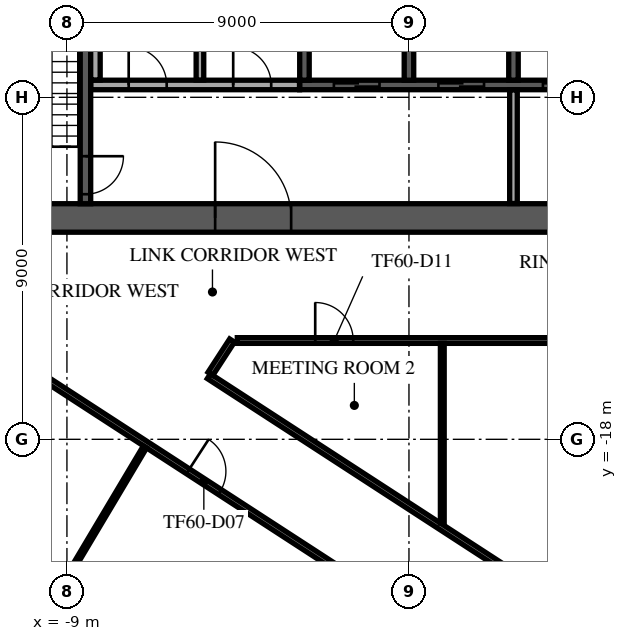
"""IFC4 building model, lengths in metres.
Left out: names, types, materials, properties, quantities, classifications, styles, units other than length and angle.
Written with IfcOpenShell. Run it as: python <this file> out.ifc"""

import sys

from ifc_helpers import new_model, si_unit, direction, frame, frame_2d, origin, place, context, subcontext, project, spatial, rectangle, extrude, element, fill, save


model = new_model("IFC4")
c1 = context("Model", 3, precision=1e-05, world=origin(), true_north=direction((0.0, 1.0)))
c2 = subcontext(c1, "Body", "Model", "MODEL_VIEW")
j1 = project(units=[si_unit("LENGTHUNIT", "METRE"), si_unit("PLANEANGLEUNIT", "RADIAN")], contexts=[c1])
p1 = place(None, origin())
s1 = spatial("IfcSite", under=j1, at=p1, CompositionType="ELEMENT")
p2 = place(p1, origin())
s2 = spatial("IfcBuilding", under=s1, at=p2, CompositionType="ELEMENT")
p3 = place(p2, frame((0.0, 0.0, 254.9)))
s3 = spatial("IfcBuildingStorey", under=s2, at=p3, CompositionType="ELEMENT", Elevation=254.9)
p4 = place(p3, frame((-12.55, -12.175, 0.0), z_axis=(0.0, 0.0, 1.0), x_axis=(1.0, 0.0, 0.0)))
e1 = element("IfcWall", 1, at=p4, inside=s3, PredefinedType="SHEAR", context=c2, shape_type="SweptSolid", body=[
    extrude(rectangle(XDim=25.1, YDim=0.75, at=frame_2d((12.55, 0.0))), origin(), (0.0, 0.0, 1.0), 3.64),
])
p5 = place(p4, frame((7.45, 0.0, 0.0)))
e2 = element("IfcOpeningElement", 2, at=p5, cuts=e1, PredefinedType="OPENING", context=c2, shape_type="SweptSolid", body=[
    extrude(rectangle(XDim=2.0, YDim=2.1, at=frame_2d((1.0, 1.05))), frame((0.0, 0.385, 0.0), z_axis=(0.0, -1.0, 0.0), x_axis=(1.0, 0.0, 0.0)), (0.0, 0.0, 1.0), 0.77),
])
p6 = place(p4, frame((17.575, 0.0, 0.0)))
e3 = element("IfcOpeningElement", 3, at=p6, cuts=e1, PredefinedType="OPENING", context=c2, shape_type="SweptSolid", body=[
    extrude(rectangle(XDim=1.2, YDim=2.1, at=frame_2d((0.6, 1.05))), frame((0.0, 0.385, 0.0), z_axis=(0.0, -1.0, 0.0), x_axis=(1.0, 0.0, 0.0)), (0.0, 0.0, 1.0), 0.77),
])
p7 = place(p4, frame((1.725, 0.0, 0.0)))
e4 = element("IfcOpeningElement", 4, at=p7, cuts=e1, PredefinedType="OPENING", context=c2, shape_type="SweptSolid", body=[
    extrude(rectangle(XDim=1.2, YDim=2.1, at=frame_2d((0.6, 1.05))), frame((0.0, 0.385, 0.0), z_axis=(0.0, -1.0, 0.0), x_axis=(1.0, 0.0, 0.0)), (0.0, 0.0, 1.0), 0.77),
])
p8 = place(p4, frame((22.175, 0.0, 0.0)))
e5 = element("IfcOpeningElement", 5, at=p8, cuts=e1, PredefinedType="OPENING", context=c2, shape_type="SweptSolid", body=[
    extrude(rectangle(XDim=1.2, YDim=2.1, at=frame_2d((0.6, 1.05))), frame((0.0, 0.385, 0.0), z_axis=(0.0, -1.0, 0.0), x_axis=(1.0, 0.0, 0.0)), (0.0, 0.0, 1.0), 0.77),
])
p9 = place(p3, frame((-2.875, -8.675, 0.0), z_axis=(0.0, 0.0, 1.0), x_axis=(1.0, 0.0, 0.0)))
e6 = element("IfcWall", 6, at=p9, inside=s3, PredefinedType="SOLIDWALL", context=c2, shape_type="SweptSolid", body=[
    extrude(rectangle(XDim=11.25, YDim=0.25, at=frame_2d((5.625, 0.0))), origin(), (0.0, 0.0, 1.0), 3.64),
])
p10 = place(p9, frame((0.9, 0.0, 0.0)))
e7 = element("IfcOpeningElement", 7, at=p10, cuts=e6, PredefinedType="OPENING", context=c2, shape_type="SweptSolid", body=[
    extrude(rectangle(XDim=1.2, YDim=2.1, at=frame_2d((0.6, 1.05))), frame((0.0, 0.135, 0.0), z_axis=(0.0, -1.0, 0.0), x_axis=(1.0, 0.0, 0.0)), (0.0, 0.0, 1.0), 0.27),
])
p11 = place(p9, frame((3.65, 0.0, 0.0)))
e8 = element("IfcOpeningElement", 8, at=p11, cuts=e6, PredefinedType="OPENING", context=c2, shape_type="SweptSolid", body=[
    extrude(rectangle(XDim=1.2, YDim=2.1, at=frame_2d((0.6, 1.05))), frame((0.0, 0.135, 0.0), z_axis=(0.0, -1.0, 0.0), x_axis=(1.0, 0.0, 0.0)), (0.0, 0.0, 1.0), 0.27),
])
p12 = place(p9, frame((6.4, 0.0, 0.0)))
e9 = element("IfcOpeningElement", 9, at=p12, cuts=e6, PredefinedType="OPENING", context=c2, shape_type="SweptSolid", body=[
    extrude(rectangle(XDim=1.2, YDim=2.1, at=frame_2d((0.6, 1.05))), frame((0.0, 0.135, 0.0), z_axis=(0.0, -1.0, 0.0), x_axis=(1.0, 0.0, 0.0)), (0.0, 0.0, 1.0), 0.27),
])
p13 = place(p9, frame((9.15, 0.0, 0.0)))
e10 = element("IfcOpeningElement", 10, at=p13, cuts=e6, PredefinedType="OPENING", context=c2, shape_type="SweptSolid", body=[
    extrude(rectangle(XDim=1.2, YDim=2.1, at=frame_2d((0.6, 1.05))), frame((0.0, 0.135, 0.0), z_axis=(0.0, -1.0, 0.0), x_axis=(1.0, 0.0, 0.0)), (0.0, 0.0, 1.0), 0.27),
])
for number, where, z_axis, x_axis in (
    (11, (-2.75, -8.55, 0.0), (0.0, 0.0, 1.0), (0.0, 1.0, 0.0)),
    (12, (0.0, -8.55, 0.0), (0.0, 0.0, 1.0), (0.0, 1.0, 0.0)),
    (13, (2.75, -8.55, 0.0), (0.0, 0.0, 1.0), (0.0, 1.0, 0.0)),
):
    element("IfcWall", number, at=place(p3, frame(where, z_axis=z_axis, x_axis=x_axis)), inside=s3, PredefinedType="SOLIDWALL", context=c2, shape_type="SweptSolid", body=[
        extrude(rectangle(XDim=2.7, YDim=0.25, at=frame_2d((1.35, 0.0))), origin(), (0.0, 0.0, 1.0), 3.64),
    ])
p14 = place(p3, frame((-8.512, -4.55, 0.0), z_axis=(0.0, 0.0, 1.0), x_axis=(0.0, -1.0, 0.0)))
e14 = element("IfcWall", 14, at=p14, inside=s3, PredefinedType="SOLIDWALL", context=c2, shape_type="SweptSolid", body=[
    extrude(rectangle(XDim=7.25, YDim=0.275, at=frame_2d((3.625, 0.0))), origin(), (0.0, 0.0, 1.0), 3.64),
])
p15 = place(p14, frame((6.0, 0.0, 0.0)))
e15 = element("IfcOpeningElement", 15, at=p15, cuts=e14, PredefinedType="OPENING", context=c2, shape_type="SweptSolid", body=[
    extrude(rectangle(XDim=1.0, YDim=2.1, at=frame_2d((0.5, 1.05))), frame((0.0, 0.147, 0.0), z_axis=(0.0, -1.0, 0.0), x_axis=(1.0, 0.0, 0.0)), (0.0, 0.0, 1.0), 0.295),
])
p16 = place(p3, frame((2.75, -11.795, 0.0), z_axis=(0.0, 0.0, 1.0), x_axis=(0.0, 1.0, 0.0)))
e16 = element("IfcWall", 16, at=p16, inside=s3, PredefinedType="PARTITIONING", context=c2, shape_type="SweptSolid", body=[
    extrude(rectangle(XDim=2.99, YDim=0.2, at=frame_2d((1.495, 0.0))), origin(), (0.0, 0.0, 1.0), 3.64),
])
p17 = place(p3, frame((-8.37, -8.675, 0.0), z_axis=(0.0, 0.0, 1.0), x_axis=(1.0, 0.0, 0.0)))
e17 = element("IfcWall", 17, at=p17, inside=s3, PredefinedType="PARTITIONING", context=c2, shape_type="SweptSolid", body=[
    extrude(rectangle(XDim=5.49, YDim=0.25, at=frame_2d((2.745, 0.0))), origin(), (0.0, 0.0, 1.0), 3.64),
])
p18 = place(p17, frame((0.995, 0.0, 0.0)))
e18 = element("IfcOpeningElement", 18, at=p18, cuts=e17, PredefinedType="OPENING", context=c2, shape_type="SweptSolid", body=[
    extrude(rectangle(XDim=1.0, YDim=2.1, at=frame_2d((0.5, 1.05))), frame((0.0, 0.135, 0.0), z_axis=(0.0, -1.0, 0.0), x_axis=(1.0, 0.0, 0.0)), (0.0, 0.0, 1.0), 0.27),
])
p19 = place(p17, frame((3.745, 0.0, 0.0)))
e19 = element("IfcOpeningElement", 19, at=p19, cuts=e17, PredefinedType="OPENING", context=c2, shape_type="SweptSolid", body=[
    extrude(rectangle(XDim=1.0, YDim=2.1, at=frame_2d((0.5, 1.05))), frame((0.0, 0.135, 0.0), z_axis=(0.0, -1.0, 0.0), x_axis=(1.0, 0.0, 0.0)), (0.0, 0.0, 1.0), 0.27),
])
p20 = place(p3, frame((-8.25, -8.545, 0.0), z_axis=(0.0, 0.0, 1.0), x_axis=(0.0, 1.0, 0.0)))
e20 = element("IfcWall", 20, at=p20, inside=s3, PredefinedType="PARTITIONING", context=c2, shape_type="SweptSolid", body=[
    extrude(rectangle(XDim=2.69, YDim=0.25, at=frame_2d((1.345, 0.0))), origin(), (0.0, 0.0, 1.0), 3.64),
])
p21 = place(p3, frame((-5.5, -8.545, 0.0), z_axis=(0.0, 0.0, 1.0), x_axis=(0.0, 1.0, 0.0)))
e21 = element("IfcWall", 21, at=p21, inside=s3, PredefinedType="PARTITIONING", context=c2, shape_type="SweptSolid", body=[
    extrude(rectangle(XDim=2.69, YDim=0.2, at=frame_2d((1.345, 0.0))), origin(), (0.0, 0.0, 1.0), 3.64),
])
p22 = place(p3, frame((-6.281, 33.292, 0.0), z_axis=(0.0, 0.0, 1.0), x_axis=(-0.544637268583, -0.838671715077, 0.0)))
e22 = element("IfcWall", 22, at=p22, inside=s3, PredefinedType="STANDARD", context=c2, shape_type="SweptSolid", body=[
    extrude(rectangle(XDim=48.843, YDim=0.6, at=frame_2d((24.422, 0.0))), origin(), (0.0, 0.0, 1.0), 3.64),
])
p23 = place(p22, frame((1.22, 0.0, 0.9)))
e23 = element("IfcOpeningElement", 23, at=p23, cuts=e22, PredefinedType="OPENING", context=c2, shape_type="SweptSolid", body=[
    extrude(rectangle(XDim=2.0, YDim=2.1, at=frame_2d((1.0, 1.05))), frame((0.0, 0.31, 0.0), z_axis=(0.0, -1.0, 0.0), x_axis=(1.0, 0.0, 0.0)), (0.0, 0.0, 1.0), 0.62),
])
p24 = place(p22, frame((5.66, 0.0, 0.9)))
e24 = element("IfcOpeningElement", 24, at=p24, cuts=e22, PredefinedType="OPENING", context=c2, shape_type="SweptSolid", body=[
    extrude(rectangle(XDim=2.0, YDim=2.1, at=frame_2d((1.0, 1.05))), frame((0.0, 0.31, 0.0), z_axis=(0.0, -1.0, 0.0), x_axis=(1.0, 0.0, 0.0)), (0.0, 0.0, 1.0), 0.62),
])
p25 = place(p22, frame((14.541, 0.0, 0.9)))
e25 = element("IfcOpeningElement", 25, at=p25, cuts=e22, PredefinedType="OPENING", context=c2, shape_type="SweptSolid", body=[
    extrude(rectangle(XDim=2.0, YDim=2.1, at=frame_2d((1.0, 1.05))), frame((0.0, 0.31, 0.0), z_axis=(0.0, -1.0, 0.0), x_axis=(1.0, 0.0, 0.0)), (0.0, 0.0, 1.0), 0.62),
])
p26 = place(p22, frame((18.981, 0.0, 0.9)))
e26 = element("IfcOpeningElement", 26, at=p26, cuts=e22, PredefinedType="OPENING", context=c2, shape_type="SweptSolid", body=[
    extrude(rectangle(XDim=2.0, YDim=2.1, at=frame_2d((1.0, 1.05))), frame((0.0, 0.31, 0.0), z_axis=(0.0, -1.0, 0.0), x_axis=(1.0, 0.0, 0.0)), (0.0, 0.0, 1.0), 0.62),
])
p27 = place(p22, frame((23.422, 0.0, 0.9)))
e27 = element("IfcOpeningElement", 27, at=p27, cuts=e22, PredefinedType="OPENING", context=c2, shape_type="SweptSolid", body=[
    extrude(rectangle(XDim=2.0, YDim=2.1, at=frame_2d((1.0, 1.05))), frame((0.0, 0.31, 0.0), z_axis=(0.0, -1.0, 0.0), x_axis=(1.0, 0.0, 0.0)), (0.0, 0.0, 1.0), 0.62),
])
p28 = place(p22, frame((27.862, 0.0, 0.9)))
e28 = element("IfcOpeningElement", 28, at=p28, cuts=e22, PredefinedType="OPENING", context=c2, shape_type="SweptSolid", body=[
    extrude(rectangle(XDim=2.0, YDim=2.1, at=frame_2d((1.0, 1.05))), frame((0.0, 0.31, 0.0), z_axis=(0.0, -1.0, 0.0), x_axis=(1.0, 0.0, 0.0)), (0.0, 0.0, 1.0), 0.62),
])
p29 = place(p22, frame((32.302, 0.0, 0.9)))
e29 = element("IfcOpeningElement", 29, at=p29, cuts=e22, PredefinedType="OPENING", context=c2, shape_type="SweptSolid", body=[
    extrude(rectangle(XDim=2.0, YDim=2.1, at=frame_2d((1.0, 1.05))), frame((0.0, 0.31, 0.0), z_axis=(0.0, -1.0, 0.0), x_axis=(1.0, 0.0, 0.0)), (0.0, 0.0, 1.0), 0.62),
])
p30 = place(p22, frame((36.742, 0.0, 0.9)))
e30 = element("IfcOpeningElement", 30, at=p30, cuts=e22, PredefinedType="OPENING", context=c2, shape_type="SweptSolid", body=[
    extrude(rectangle(XDim=2.0, YDim=2.1, at=frame_2d((1.0, 1.05))), frame((0.0, 0.31, 0.0), z_axis=(0.0, -1.0, 0.0), x_axis=(1.0, 0.0, 0.0)), (0.0, 0.0, 1.0), 0.62),
])
p31 = place(p22, frame((41.183, 0.0, 0.9)))
e31 = element("IfcOpeningElement", 31, at=p31, cuts=e22, PredefinedType="OPENING", context=c2, shape_type="SweptSolid", body=[
    extrude(rectangle(XDim=2.0, YDim=2.1, at=frame_2d((1.0, 1.05))), frame((0.0, 0.31, 0.0), z_axis=(0.0, -1.0, 0.0), x_axis=(1.0, 0.0, 0.0)), (0.0, 0.0, 1.0), 0.62),
])
p32 = place(p22, frame((45.623, 0.0, 0.9)))
e32 = element("IfcOpeningElement", 32, at=p32, cuts=e22, PredefinedType="OPENING", context=c2, shape_type="SweptSolid", body=[
    extrude(rectangle(XDim=2.0, YDim=2.1, at=frame_2d((1.0, 1.05))), frame((0.0, 0.31, 0.0), z_axis=(0.0, -1.0, 0.0), x_axis=(1.0, 0.0, 0.0)), (0.0, 0.0, 1.0), 0.62),
])
p33 = place(p3, frame((-31.308, -15.082, 0.0), z_axis=(0.0, 0.0, 1.0), x_axis=(0.838671071298, -0.54463825992, 0.0)))
e33 = element("IfcWall", 33, at=p33, inside=s3, PredefinedType="STANDARD", context=c2, shape_type="SweptSolid", body=[
    extrude(rectangle(XDim=36.086, YDim=0.6, at=frame_2d((18.043, 0.0))), origin(), (0.0, 0.0, 1.0), 3.64),
])
p34 = place(p33, frame((1.205, 0.0, 0.9)))
e34 = element("IfcOpeningElement", 34, at=p34, cuts=e33, PredefinedType="OPENING", context=c2, shape_type="SweptSolid", body=[
    extrude(rectangle(XDim=2.1, YDim=2.1, at=frame_2d((1.05, 1.05))), frame((0.0, 0.31, 0.0), z_axis=(0.0, -1.0, 0.0), x_axis=(1.0, 0.0, 0.0)), (0.0, 0.0, 1.0), 0.62),
])
p35 = place(p33, frame((5.716, 0.0, 0.9)))
e35 = element("IfcOpeningElement", 35, at=p35, cuts=e33, PredefinedType="OPENING", context=c2, shape_type="SweptSolid", body=[
    extrude(rectangle(XDim=2.1, YDim=2.1, at=frame_2d((1.05, 1.05))), frame((0.0, 0.31, 0.0), z_axis=(0.0, -1.0, 0.0), x_axis=(1.0, 0.0, 0.0)), (0.0, 0.0, 1.0), 0.62),
])
p36 = place(p33, frame((10.227, 0.0, 0.9)))
e36 = element("IfcOpeningElement", 36, at=p36, cuts=e33, PredefinedType="OPENING", context=c2, shape_type="SweptSolid", body=[
    extrude(rectangle(XDim=2.1, YDim=2.1, at=frame_2d((1.05, 1.05))), frame((0.0, 0.31, 0.0), z_axis=(0.0, -1.0, 0.0), x_axis=(1.0, 0.0, 0.0)), (0.0, 0.0, 1.0), 0.62),
])
p37 = place(p33, frame((14.738, 0.0, 0.9)))
e37 = element("IfcOpeningElement", 37, at=p37, cuts=e33, PredefinedType="OPENING", context=c2, shape_type="SweptSolid", body=[
    extrude(rectangle(XDim=2.1, YDim=2.1, at=frame_2d((1.05, 1.05))), frame((0.0, 0.31, 0.0), z_axis=(0.0, -1.0, 0.0), x_axis=(1.0, 0.0, 0.0)), (0.0, 0.0, 1.0), 0.62),
])
p38 = place(p33, frame((19.249, 0.0, 0.9)))
e38 = element("IfcOpeningElement", 38, at=p38, cuts=e33, PredefinedType="OPENING", context=c2, shape_type="SweptSolid", body=[
    extrude(rectangle(XDim=2.1, YDim=2.1, at=frame_2d((1.05, 1.05))), frame((0.0, 0.31, 0.0), z_axis=(0.0, -1.0, 0.0), x_axis=(1.0, 0.0, 0.0)), (0.0, 0.0, 1.0), 0.62),
])
p39 = place(p33, frame((23.759, 0.0, 0.9)))
e39 = element("IfcOpeningElement", 39, at=p39, cuts=e33, PredefinedType="OPENING", context=c2, shape_type="SweptSolid", body=[
    extrude(rectangle(XDim=2.1, YDim=2.1, at=frame_2d((1.05, 1.05))), frame((0.0, 0.31, 0.0), z_axis=(0.0, -1.0, 0.0), x_axis=(1.0, 0.0, 0.0)), (0.0, 0.0, 1.0), 0.62),
])
p40 = place(p33, frame((28.27, 0.0, 0.9)))
e40 = element("IfcOpeningElement", 40, at=p40, cuts=e33, PredefinedType="OPENING", context=c2, shape_type="SweptSolid", body=[
    extrude(rectangle(XDim=2.1, YDim=2.1, at=frame_2d((1.05, 1.05))), frame((0.0, 0.31, 0.0), z_axis=(0.0, -1.0, 0.0), x_axis=(1.0, 0.0, 0.0)), (0.0, 0.0, 1.0), 0.62),
])
p41 = place(p33, frame((32.781, 0.0, 0.9)))
e41 = element("IfcOpeningElement", 41, at=p41, cuts=e33, PredefinedType="OPENING", context=c2, shape_type="SweptSolid", body=[
    extrude(rectangle(XDim=2.1, YDim=2.1, at=frame_2d((1.05, 1.05))), frame((0.0, 0.31, 0.0), z_axis=(0.0, -1.0, 0.0), x_axis=(1.0, 0.0, 0.0)), (0.0, 0.0, 1.0), 0.62),
])
p42 = place(p3, frame((-26.791, -5.221, 0.0), z_axis=(0.0, 0.0, 1.0), x_axis=(0.838671905754, -0.544636974965, 0.0)))
e42 = element("IfcWall", 42, at=p42, inside=s3, PredefinedType="PARTITIONING", context=c2, shape_type="SweptSolid", body=[
    extrude(rectangle(XDim=39.325, YDim=0.15, at=frame_2d((19.663, 0.0))), origin(), (0.0, 0.0, 1.0), 3.04),
])
p43 = place(p42, frame((2.05, 0.0, 0.0)))
e43 = element("IfcOpeningElement", 43, at=p43, cuts=e42, PredefinedType="OPENING", context=c2, shape_type="SweptSolid", body=[
    extrude(rectangle(XDim=1.0, YDim=2.1, at=frame_2d((0.5, 1.05))), frame((0.0, 0.085, 0.0), z_axis=(0.0, -1.0, 0.0), x_axis=(1.0, 0.0, 0.0)), (0.0, 0.0, 1.0), 0.17),
])
p44 = place(p42, frame((9.807, 0.0, 0.0)))
e44 = element("IfcOpeningElement", 44, at=p44, cuts=e42, PredefinedType="OPENING", context=c2, shape_type="SweptSolid", body=[
    extrude(rectangle(XDim=1.0, YDim=2.1, at=frame_2d((0.5, 1.05))), frame((0.0, 0.085, 0.0), z_axis=(0.0, -1.0, 0.0), x_axis=(1.0, 0.0, 0.0)), (0.0, 0.0, 1.0), 0.17),
])
p45 = place(p42, frame((18.866, 0.0, 0.0)))
e45 = element("IfcOpeningElement", 45, at=p45, cuts=e42, PredefinedType="OPENING", context=c2, shape_type="SweptSolid", body=[
    extrude(rectangle(XDim=1.0, YDim=2.1, at=frame_2d((0.5, 1.05))), frame((0.0, 0.085, 0.0), z_axis=(0.0, -1.0, 0.0), x_axis=(1.0, 0.0, 0.0)), (0.0, 0.0, 1.0), 0.17),
])
p46 = place(p42, frame((25.009, 0.0, 0.0)))
e46 = element("IfcOpeningElement", 46, at=p46, cuts=e42, PredefinedType="OPENING", context=c2, shape_type="SweptSolid", body=[
    extrude(rectangle(XDim=1.0, YDim=2.1, at=frame_2d((0.5, 1.05))), frame((0.0, 0.085, 0.0), z_axis=(0.0, -1.0, 0.0), x_axis=(1.0, 0.0, 0.0)), (0.0, 0.0, 1.0), 0.17),
])
p47 = place(p42, frame((36.069, 0.0, 0.0)))
e47 = element("IfcOpeningElement", 47, at=p47, cuts=e42, PredefinedType="OPENING", context=c2, shape_type="SweptSolid", body=[
    extrude(rectangle(XDim=1.8, YDim=2.1, at=frame_2d((0.9, 1.05))), frame((0.0, 0.085, 0.0), z_axis=(0.0, -1.0, 0.0), x_axis=(1.0, 0.0, 0.0)), (0.0, 0.0, 1.0), 0.17),
])
p48 = place(p3, frame((-5.265, -16.339, 0.0), z_axis=(0.0, 0.0, 1.0), x_axis=(0.838696093785, -0.544599726653, 0.0)))
e48 = element("IfcWall", 48, at=p48, inside=s3, PredefinedType="PARTITIONING", context=c2, shape_type="SweptSolid", body=[
    extrude(rectangle(XDim=15.217, YDim=0.15, at=frame_2d((7.608, 0.0))), origin(), (0.0, 0.0, 1.0), 3.24),
])
p49 = place(p3, frame((-5.224, -16.276, 0.0), z_axis=(0.0, 0.0, 1.0), x_axis=(0.544684420792, 0.838641092331, 0.0)))
e49 = element("IfcWall", 49, at=p49, inside=s3, PredefinedType="PARTITIONING", context=c2, shape_type="SweptSolid", body=[
    extrude(rectangle(XDim=1.045, YDim=0.15, at=frame_2d((0.522, 0.0))), origin(), (0.0, 0.0, 1.0), 3.24),
])
p50 = place(p3, frame((-4.517, -15.4, 0.0), z_axis=(0.0, 0.0, 1.0), x_axis=(1.0, 0.0, 0.0)))
e50 = element("IfcWall", 50, at=p50, inside=s3, PredefinedType="PARTITIONING", context=c2, shape_type="SweptSolid", body=[
    extrude(rectangle(XDim=19.917, YDim=0.15, at=frame_2d((9.958, 0.0))), origin(), (0.0, 0.0, 1.0), 3.24),
])
p51 = place(p50, frame((2.05, 0.0, 0.0)))
e51 = element("IfcOpeningElement", 51, at=p51, cuts=e50, PredefinedType="OPENING", context=c2, shape_type="SweptSolid", body=[
    extrude(rectangle(XDim=1.0, YDim=2.1, at=frame_2d((0.5, 1.05))), frame((0.0, 0.085, 0.0), z_axis=(0.0, -1.0, 0.0), x_axis=(1.0, 0.0, 0.0)), (0.0, 0.0, 1.0), 0.17),
])
p52 = place(p50, frame((8.444, 0.0, 0.0)))
e52 = element("IfcOpeningElement", 52, at=p52, cuts=e50, PredefinedType="OPENING", context=c2, shape_type="SweptSolid", body=[
    extrude(rectangle(XDim=1.0, YDim=2.1, at=frame_2d((0.5, 1.05))), frame((0.0, 0.085, 0.0), z_axis=(0.0, -1.0, 0.0), x_axis=(1.0, 0.0, 0.0)), (0.0, 0.0, 1.0), 0.17),
])
p53 = place(p50, frame((13.014, 0.0, 0.0)))
e53 = element("IfcOpeningElement", 53, at=p53, cuts=e50, PredefinedType="OPENING", context=c2, shape_type="SweptSolid", body=[
    extrude(rectangle(XDim=1.0, YDim=2.1, at=frame_2d((0.5, 1.05))), frame((0.0, 0.085, 0.0), z_axis=(0.0, -1.0, 0.0), x_axis=(1.0, 0.0, 0.0)), (0.0, 0.0, 1.0), 0.17),
])
p54 = place(p3, frame((-12.248, -27.099, 0.0), z_axis=(0.0, 0.0, 1.0), x_axis=(0.511779266972, 0.859116978005, 0.0)))
e54 = element("IfcWall", 54, at=p54, inside=s3, PredefinedType="PARTITIONING", context=c2, shape_type="SweptSolid", body=[
    extrude(rectangle(XDim=10.358, YDim=0.1, at=frame_2d((5.179, 0.0))), origin(), (0.0, 0.0, 1.0), 3.04),
])
p55 = place(p3, frame((0.877, -20.205, 0.0), z_axis=(0.0, 0.0, 1.0), x_axis=(0.0, 1.0, 0.0)))
e55 = element("IfcWall", 55, at=p55, inside=s3, PredefinedType="PARTITIONING", context=c2, shape_type="SweptSolid", body=[
    extrude(rectangle(XDim=4.73, YDim=0.1, at=frame_2d((2.365, 0.0))), origin(), (0.0, 0.0, 1.0), 3.64),
])
p56 = place(p5, origin())
e56 = element("IfcDoor", 56, at=p56, inside=s3, OperationType="SINGLE_SWING_LEFT", PredefinedType="DOOR", context=c2, shape_type="SweptSolid", body=[
    extrude(rectangle(XDim=2.0, YDim=2.1, at=frame_2d((1.0, 1.05))), frame((0.0, 0.025, 0.0), z_axis=(0.0, -1.0, 0.0), x_axis=(1.0, 0.0, 0.0)), (0.0, 0.0, 1.0), 0.05),
])
fill(e2, e56)
p57 = place(p10, origin())
e57 = element("IfcDoor", 57, at=p57, inside=s3, OperationType="DOUBLE_DOOR_SLIDING", PredefinedType="DOOR", context=c2, shape_type="SweptSolid", body=[
    extrude(rectangle(XDim=1.2, YDim=2.1, at=frame_2d((0.6, 1.05))), frame((0.0, 0.025, 0.0), z_axis=(0.0, -1.0, 0.0), x_axis=(1.0, 0.0, 0.0)), (0.0, 0.0, 1.0), 0.05),
])
fill(e7, e57)
p58 = place(p11, origin())
e58 = element("IfcDoor", 58, at=p58, inside=s3, OperationType="DOUBLE_DOOR_SLIDING", PredefinedType="DOOR", context=c2, shape_type="SweptSolid", body=[
    extrude(rectangle(XDim=1.2, YDim=2.1, at=frame_2d((0.6, 1.05))), frame((0.0, 0.025, 0.0), z_axis=(0.0, -1.0, 0.0), x_axis=(1.0, 0.0, 0.0)), (0.0, 0.0, 1.0), 0.05),
])
fill(e8, e58)
p59 = place(p12, origin())
e59 = element("IfcDoor", 59, at=p59, inside=s3, OperationType="DOUBLE_DOOR_SLIDING", PredefinedType="DOOR", context=c2, shape_type="SweptSolid", body=[
    extrude(rectangle(XDim=1.2, YDim=2.1, at=frame_2d((0.6, 1.05))), frame((0.0, 0.025, 0.0), z_axis=(0.0, -1.0, 0.0), x_axis=(1.0, 0.0, 0.0)), (0.0, 0.0, 1.0), 0.05),
])
fill(e9, e59)
p60 = place(p15, origin())
e60 = element("IfcDoor", 60, at=p60, inside=s3, OperationType="SINGLE_SWING_LEFT", PredefinedType="DOOR", context=c2, shape_type="SweptSolid", body=[
    extrude(rectangle(XDim=1.0, YDim=2.1, at=frame_2d((0.5, 1.05))), frame((0.0, 0.025, 0.0), z_axis=(0.0, -1.0, 0.0), x_axis=(1.0, 0.0, 0.0)), (0.0, 0.0, 1.0), 0.05),
])
fill(e15, e60)
p61 = place(p18, origin())
e61 = element("IfcDoor", 61, at=p61, inside=s3, OperationType="SINGLE_SWING_LEFT", PredefinedType="DOOR", context=c2, shape_type="SweptSolid", body=[
    extrude(rectangle(XDim=1.0, YDim=2.1, at=frame_2d((0.5, 1.05))), frame((0.0, 0.025, 0.0), z_axis=(0.0, -1.0, 0.0), x_axis=(1.0, 0.0, 0.0)), (0.0, 0.0, 1.0), 0.05),
])
fill(e18, e61)
p62 = place(p19, origin())
e62 = element("IfcDoor", 62, at=p62, inside=s3, OperationType="SINGLE_SWING_LEFT", PredefinedType="DOOR", context=c2, shape_type="SweptSolid", body=[
    extrude(rectangle(XDim=1.0, YDim=2.1, at=frame_2d((0.5, 1.05))), frame((0.0, 0.025, 0.0), z_axis=(0.0, -1.0, 0.0), x_axis=(1.0, 0.0, 0.0)), (0.0, 0.0, 1.0), 0.05),
])
fill(e19, e62)
p63 = place(p46, frame((1.0, 0.0, 0.0), z_axis=(0.0, 0.0, 1.0), x_axis=(-1.0, 0.0, 0.0)))
e63 = element("IfcDoor", 63, at=p63, inside=s3, OperationType="SINGLE_SWING_RIGHT", PredefinedType="DOOR", context=c2, shape_type="SweptSolid", body=[
    extrude(rectangle(XDim=1.0, YDim=2.1, at=frame_2d((0.5, 1.05))), frame((0.0, 0.025, 0.0), z_axis=(0.0, -1.0, 0.0), x_axis=(1.0, 0.0, 0.0)), (0.0, 0.0, 1.0), 0.05),
])
fill(e46, e63)
p64 = place(p51, frame((1.0, 0.0, 0.0), z_axis=(0.0, 0.0, 1.0), x_axis=(-1.0, 0.0, 0.0)))
e64 = element("IfcDoor", 64, at=p64, inside=s3, OperationType="SINGLE_SWING_RIGHT", PredefinedType="DOOR", context=c2, shape_type="SweptSolid", body=[
    extrude(rectangle(XDim=1.0, YDim=2.1, at=frame_2d((0.5, 1.05))), frame((0.0, 0.025, 0.0), z_axis=(0.0, -1.0, 0.0), x_axis=(1.0, 0.0, 0.0)), (0.0, 0.0, 1.0), 0.05),
])
fill(e51, e64)
save(model, sys.argv[1])
